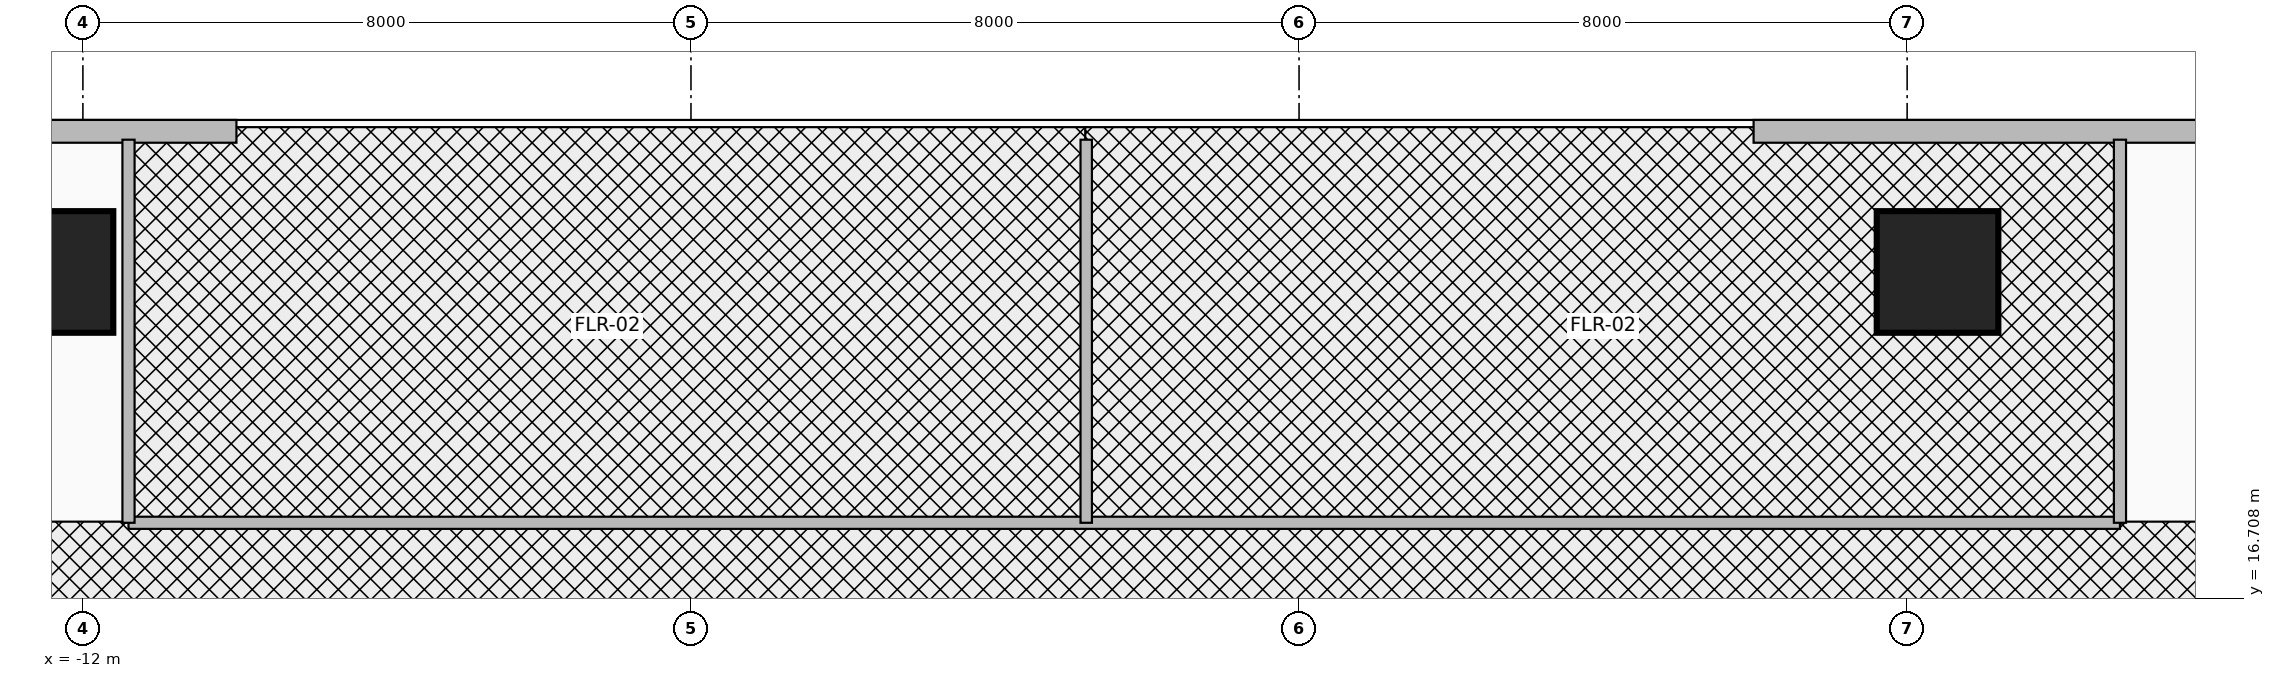
"""IFC4 building model, lengths in metres.
Left out: names, types, materials, properties, quantities, classifications, styles, units other than length and angle.
Written with IfcOpenShell. Run it as: python <this file> out.ifc"""

import sys

from ifc_helpers import new_model, si_unit, direction, frame, frame_2d, origin, origin_2d, place, context, subcontext, project, spatial, rectangle, extrude, source, transform, mapped, element, fill, save


model = new_model("IFC4")
c1 = context("Model", 3, precision=1e-05, world=origin(), true_north=direction((0.0, 1.0)))
c2 = subcontext(c1, "Body", "Model", "MODEL_VIEW")
j1 = project(units=[si_unit("LENGTHUNIT", "METRE"), si_unit("PLANEANGLEUNIT", "RADIAN")], contexts=[c1])
p1 = place(None, origin())
s1 = spatial("IfcSite", under=j1, at=p1, CompositionType="ELEMENT")
p2 = place(p1, origin())
s2 = spatial("IfcBuilding", under=s1, at=p2, CompositionType="ELEMENT")
p3 = place(p2, frame((0.0, 0.0, 20.8)))
s3 = spatial("IfcBuildingStorey", under=s2, at=p3, CompositionType="ELEMENT", Elevation=20.8)
m1 = source(origin(), c2, "Body", "SweptSolid", [
    extrude(rectangle(XDim=1.6, YDim=1.6, at=origin_2d()), origin(), (0.0, 0.0, 1.0), 5.2),
])
for number, where, z_axis, x_axis in (
    (1, (-12.4, 21.0, 0.0), (0.0, 0.0, 1.0), (1.0, 0.0, 0.0)),
    (2, (12.4, 21.0, 0.0), (0.0, 0.0, 1.0), (1.0, 0.0, 0.0)),
):
    element("IfcColumn", number, at=place(p3, frame(where, z_axis=z_axis, x_axis=x_axis)), inside=s3, PredefinedType="COLUMN", context=c2, shape_type="MappedRepresentation", body=[
        mapped(m1, transform((0.0, 0.0, 0.0), x_axis=(1.0, 0.0, 0.0), y_axis=(0.0, 1.0, 0.0), z_axis=(0.0, 0.0, 1.0), scale=1.0)),
    ])
p4 = place(p3, frame((-33.85, 22.85, 0.0), z_axis=(0.0, 0.0, 1.0), x_axis=(1.0, 0.0, 0.0)))
e3 = element("IfcWall", 3, at=p4, inside=s3, PredefinedType="SOLIDWALL", context=c2, shape_type="SweptSolid", body=[
    extrude(rectangle(XDim=23.87, YDim=0.3, at=frame_2d((11.935, 0.0))), origin(), (0.0, 0.0, 1.0), 4.96),
])
p5 = place(p4, frame((3.2, 0.0, 0.9)))
e4 = element("IfcOpeningElement", 4, at=p5, cuts=e3, PredefinedType="OPENING", context=c2, shape_type="SweptSolid", body=[
    extrude(rectangle(XDim=1.5, YDim=1.75, at=frame_2d((0.75, 0.875))), frame((0.0, 0.165, 0.0), z_axis=(0.0, -1.0, 0.0), x_axis=(1.0, 0.0, 0.0)), (0.0, 0.0, 1.0), 0.33),
])
p6 = place(p4, frame((10.0, 0.0, 0.9)))
e5 = element("IfcOpeningElement", 5, at=p6, cuts=e3, PredefinedType="OPENING", context=c2, shape_type="SweptSolid", body=[
    extrude(rectangle(XDim=1.5, YDim=1.75, at=frame_2d((0.75, 0.875))), frame((0.0, 0.165, 0.0), z_axis=(0.0, -1.0, 0.0), x_axis=(1.0, 0.0, 0.0)), (0.0, 0.0, 1.0), 0.33),
])
p7 = place(p4, frame((17.8, 0.0, 0.9)))
e6 = element("IfcOpeningElement", 6, at=p7, cuts=e3, PredefinedType="OPENING", context=c2, shape_type="SweptSolid", body=[
    extrude(rectangle(XDim=1.5, YDim=1.75, at=frame_2d((0.75, 0.875))), frame((0.0, 0.165, 0.0), z_axis=(0.0, -1.0, 0.0), x_axis=(1.0, 0.0, 0.0)), (0.0, 0.0, 1.0), 0.33),
])
p8 = place(p3, frame((9.98, 22.85, 0.0), z_axis=(0.0, 0.0, 1.0), x_axis=(1.0, 0.0, 0.0)))
e7 = element("IfcWall", 7, at=p8, inside=s3, PredefinedType="SOLIDWALL", context=c2, shape_type="SweptSolid", body=[
    extrude(rectangle(XDim=23.87, YDim=0.3, at=frame_2d((11.935, 0.0))), origin(), (0.0, 0.0, 1.0), 4.96),
])
p9 = place(p8, frame((3.2, 0.0, 0.9)))
e8 = element("IfcOpeningElement", 8, at=p9, cuts=e7, PredefinedType="OPENING", context=c2, shape_type="SweptSolid", body=[
    extrude(rectangle(XDim=1.5, YDim=1.75, at=frame_2d((0.75, 0.875))), frame((0.0, 0.165, 0.0), z_axis=(0.0, -1.0, 0.0), x_axis=(1.0, 0.0, 0.0)), (0.0, 0.0, 1.0), 0.33),
])
p10 = place(p8, frame((10.0, 0.0, 0.9)))
e9 = element("IfcOpeningElement", 9, at=p10, cuts=e7, PredefinedType="OPENING", context=c2, shape_type="SweptSolid", body=[
    extrude(rectangle(XDim=1.5, YDim=1.75, at=frame_2d((0.75, 0.875))), frame((0.0, 0.165, 0.0), z_axis=(0.0, -1.0, 0.0), x_axis=(1.0, 0.0, 0.0)), (0.0, 0.0, 1.0), 0.33),
])
p11 = place(p8, frame((17.8, 0.0, 0.9)))
e10 = element("IfcOpeningElement", 10, at=p11, cuts=e7, PredefinedType="OPENING", context=c2, shape_type="SweptSolid", body=[
    extrude(rectangle(XDim=1.5, YDim=1.75, at=frame_2d((0.75, 0.875))), frame((0.0, 0.165, 0.0), z_axis=(0.0, -1.0, 0.0), x_axis=(1.0, 0.0, 0.0)), (0.0, 0.0, 1.0), 0.33),
])
p12 = place(p3, frame((-11.4, 17.7, 0.0), z_axis=(0.0, 0.0, 1.0), x_axis=(1.0, 0.0, 0.0)))
e11 = element("IfcWall", 11, at=p12, inside=s3, PredefinedType="PARTITIONING", context=c2, shape_type="SweptSolid", body=[
    extrude(rectangle(XDim=26.2, YDim=0.16, at=frame_2d((13.1, 0.0))), origin(), (0.0, 0.0, 1.0), 4.96),
])
p13 = place(p12, frame((4.5, 0.0, 0.0)))
e12 = element("IfcOpeningElement", 12, at=p13, cuts=e11, PredefinedType="OPENING", context=c2, shape_type="SweptSolid", body=[
    extrude(rectangle(XDim=1.8, YDim=2.15, at=frame_2d((0.9, 1.075))), frame((0.0, 0.095, 0.0), z_axis=(0.0, -1.0, 0.0), x_axis=(1.0, 0.0, 0.0)), (0.0, 0.0, 1.0), 0.19),
])
p14 = place(p12, frame((17.5, 0.0, 0.0)))
e13 = element("IfcOpeningElement", 13, at=p14, cuts=e11, PredefinedType="OPENING", context=c2, shape_type="SweptSolid", body=[
    extrude(rectangle(XDim=1.8, YDim=2.15, at=frame_2d((0.9, 1.075))), frame((0.0, 0.095, 0.0), z_axis=(0.0, -1.0, 0.0), x_axis=(1.0, 0.0, 0.0)), (0.0, 0.0, 1.0), 0.19),
])
for number, where, z_axis, x_axis in (
    (14, (-11.4, 17.7, 0.0), (0.0, 0.0, 1.0), (0.0, 1.0, 0.0)),
    (15, (14.8, 17.7, 0.0), (0.0, 0.0, 1.0), (0.0, 1.0, 0.0)),
):
    element("IfcWall", number, at=place(p3, frame(where, z_axis=z_axis, x_axis=x_axis)), inside=s3, PredefinedType="PARTITIONING", context=c2, shape_type="SweptSolid", body=[
        extrude(rectangle(XDim=5.04, YDim=0.16, at=frame_2d((2.52, 0.0))), origin(), (0.0, 0.0, 1.0), 3.997),
    ])
p15 = place(p3, frame((1.2, 17.7, 0.0), z_axis=(0.0, 0.0, 1.0), x_axis=(0.0, 1.0, 0.0)))
e16 = element("IfcWall", 16, at=p15, inside=s3, PredefinedType="PARTITIONING", context=c2, shape_type="SweptSolid", body=[
    extrude(rectangle(XDim=5.04, YDim=0.15, at=frame_2d((2.52, 0.0))), origin(), (0.0, 0.0, 1.0), 3.997),
])
p16 = place(p9, origin())
e17 = element("IfcWindow", 17, at=p16, inside=s3, PartitioningType="SINGLE_PANEL", PredefinedType="WINDOW", context=c2, shape_type="SweptSolid", body=[
    extrude(rectangle(XDim=1.5, YDim=1.75, at=frame_2d((0.75, 0.875))), frame((0.0, 0.03, 0.0), z_axis=(0.0, -1.0, 0.0), x_axis=(1.0, 0.0, 0.0)), (0.0, 0.0, 1.0), 0.06),
])
fill(e8, e17)
p17 = place(p13, frame((1.8, 0.0, 0.0), z_axis=(0.0, 0.0, 1.0), x_axis=(-1.0, 0.0, 0.0)))
e18 = element("IfcDoor", 18, at=p17, inside=s3, OperationType="DOUBLE_DOOR_SINGLE_SWING", PredefinedType="DOOR", context=c2, shape_type="SweptSolid", body=[
    extrude(rectangle(XDim=1.8, YDim=2.15, at=frame_2d((0.9, 1.075))), frame((0.0, 0.025, 0.0), z_axis=(0.0, -1.0, 0.0), x_axis=(1.0, 0.0, 0.0)), (0.0, 0.0, 1.0), 0.05),
])
fill(e12, e18)
p18 = place(p14, origin())
e19 = element("IfcDoor", 19, at=p18, inside=s3, OperationType="DOUBLE_DOOR_SINGLE_SWING", PredefinedType="DOOR", context=c2, shape_type="SweptSolid", body=[
    extrude(rectangle(XDim=1.8, YDim=2.15, at=frame_2d((0.9, 1.075))), frame((0.0, 0.025, 0.0), z_axis=(0.0, -1.0, 0.0), x_axis=(1.0, 0.0, 0.0)), (0.0, 0.0, 1.0), 0.05),
])
fill(e13, e19)
save(model, sys.argv[1])
